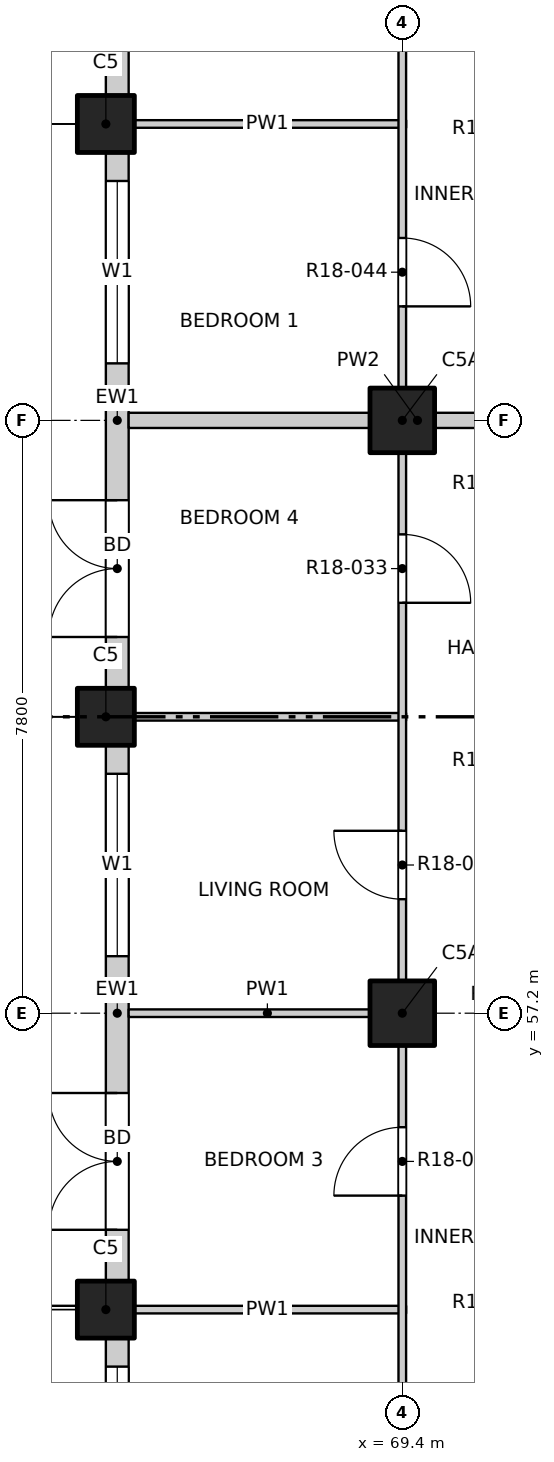
"""IFC4 building model, lengths in metres.
Left out: names, types, materials, properties, quantities, classifications, styles, units other than length and angle.
Written with IfcOpenShell. Run it as: python <this file> out.ifc"""

import sys

from ifc_helpers import new_model, si_unit, direction, frame, frame_2d, origin, origin_2d, place, context, subcontext, project, spatial, rectangle, extrude, element, fill, save


model = new_model("IFC4")
c1 = context("Model", 3, precision=1e-05, world=origin(), true_north=direction((0.0, 1.0)))
c2 = subcontext(c1, "Body", "Model", "MODEL_VIEW")
j1 = project(units=[si_unit("LENGTHUNIT", "METRE"), si_unit("PLANEANGLEUNIT", "RADIAN")], contexts=[c1])
p1 = place(None, origin())
s1 = spatial("IfcSite", under=j1, at=p1, CompositionType="ELEMENT")
p2 = place(p1, origin())
s2 = spatial("IfcBuilding", under=s1, at=p2, CompositionType="ELEMENT")
p3 = place(p2, frame((0.0, 0.0, 186.0)))
s3 = spatial("IfcBuildingStorey", under=s2, at=p3, CompositionType="ELEMENT", Elevation=186.0)
for number, where, z_axis, x_axis in (
    (1, (65.5, 53.3, -0.25), (0.0, 0.0, 1.0), (1.0, 0.0, 0.0)),
    (2, (65.5, 61.1, -0.25), (0.0, 0.0, 1.0), (1.0, 0.0, 0.0)),
    (3, (65.5, 68.9, -0.25), (0.0, 0.0, 1.0), (1.0, 0.0, 0.0)),
):
    element("IfcColumn", number, at=place(p3, frame(where, z_axis=z_axis, x_axis=x_axis)), inside=s3, PredefinedType="COLUMN", context=c2, shape_type="SweptSolid", body=[
        extrude(rectangle(XDim=0.75, YDim=0.75, at=origin_2d()), origin(), (0.0, 0.0, 1.0), 3.4),
    ])
for number, where, z_axis, x_axis in (
    (4, (69.4, 57.2, -0.25), (0.0, 0.0, 1.0), (1.0, 0.0, 0.0)),
    (5, (69.4, 65.0, -0.25), (0.0, 0.0, 1.0), (1.0, 0.0, 0.0)),
):
    element("IfcColumn", number, at=place(p3, frame(where, z_axis=z_axis, x_axis=x_axis)), inside=s3, PredefinedType="COLUMN", context=c2, shape_type="SweptSolid", body=[
        extrude(rectangle(XDim=0.85, YDim=0.85, at=origin_2d()), origin(), (0.0, 0.0, 1.0), 3.4),
    ])
p4 = place(p3, frame((65.65, 49.4, 0.0), z_axis=(0.0, 0.0, 1.0), x_axis=(0.0, 1.0, 0.0)))
e6 = element("IfcWall", 6, at=p4, inside=s3, PredefinedType="SOLIDWALL", context=c2, shape_type="SweptSolid", body=[
    extrude(rectangle(XDim=3.525, YDim=0.3, at=frame_2d((1.763, 0.0))), origin(), (0.0, 0.0, 1.0), 2.7),
])
p5 = place(p4, frame((0.75, 0.0, 0.9)))
e7 = element("IfcOpeningElement", 7, at=p5, cuts=e6, PredefinedType="OPENING", context=c2, shape_type="SweptSolid", body=[
    extrude(rectangle(XDim=2.4, YDim=1.8, at=frame_2d((1.2, 0.9))), frame((0.0, 0.16, 0.0), z_axis=(0.0, -1.0, 0.0), x_axis=(1.0, 0.0, 0.0)), (0.0, 0.0, 1.0), 0.32),
])
p6 = place(p3, frame((65.65, 53.675, 0.0), z_axis=(0.0, 0.0, 1.0), x_axis=(0.0, 1.0, 0.0)))
e8 = element("IfcWall", 8, at=p6, inside=s3, PredefinedType="SOLIDWALL", context=c2, shape_type="SweptSolid", body=[
    extrude(rectangle(XDim=7.05, YDim=0.3, at=frame_2d((3.525, 0.0))), origin(), (0.0, 0.0, 1.0), 2.7),
])
p7 = place(p6, frame((0.675, 0.0, 0.0)))
e9 = element("IfcOpeningElement", 9, at=p7, cuts=e8, PredefinedType="OPENING", context=c2, shape_type="SweptSolid", body=[
    extrude(rectangle(XDim=1.8, YDim=2.4, at=frame_2d((0.9, 1.2))), frame((0.0, 0.16, 0.0), z_axis=(0.0, -1.0, 0.0), x_axis=(1.0, 0.0, 0.0)), (0.0, 0.0, 1.0), 0.32),
])
p8 = place(p6, frame((4.275, 0.0, 0.9)))
e10 = element("IfcOpeningElement", 10, at=p8, cuts=e8, PredefinedType="OPENING", context=c2, shape_type="SweptSolid", body=[
    extrude(rectangle(XDim=2.4, YDim=1.8, at=frame_2d((1.2, 0.9))), frame((0.0, 0.16, 0.0), z_axis=(0.0, -1.0, 0.0), x_axis=(1.0, 0.0, 0.0)), (0.0, 0.0, 1.0), 0.32),
])
p9 = place(p3, frame((65.65, 61.475, 0.0), z_axis=(0.0, 0.0, 1.0), x_axis=(0.0, 1.0, 0.0)))
e11 = element("IfcWall", 11, at=p9, inside=s3, PredefinedType="SOLIDWALL", context=c2, shape_type="SweptSolid", body=[
    extrude(rectangle(XDim=7.05, YDim=0.3, at=frame_2d((3.525, 0.0))), origin(), (0.0, 0.0, 1.0), 2.7),
])
p10 = place(p9, frame((0.675, 0.0, 0.0)))
e12 = element("IfcOpeningElement", 12, at=p10, cuts=e11, PredefinedType="OPENING", context=c2, shape_type="SweptSolid", body=[
    extrude(rectangle(XDim=1.8, YDim=2.4, at=frame_2d((0.9, 1.2))), frame((0.0, 0.16, 0.0), z_axis=(0.0, -1.0, 0.0), x_axis=(1.0, 0.0, 0.0)), (0.0, 0.0, 1.0), 0.32),
])
p11 = place(p9, frame((4.275, 0.0, 0.9)))
e13 = element("IfcOpeningElement", 13, at=p11, cuts=e11, PredefinedType="OPENING", context=c2, shape_type="SweptSolid", body=[
    extrude(rectangle(XDim=2.4, YDim=1.8, at=frame_2d((1.2, 0.9))), frame((0.0, 0.16, 0.0), z_axis=(0.0, -1.0, 0.0), x_axis=(1.0, 0.0, 0.0)), (0.0, 0.0, 1.0), 0.32),
])
p12 = place(p3, frame((65.65, 69.275, 0.0), z_axis=(0.0, 0.0, 1.0), x_axis=(0.0, 1.0, 0.0)))
e14 = element("IfcWall", 14, at=p12, inside=s3, PredefinedType="SOLIDWALL", context=c2, shape_type="SweptSolid", body=[
    extrude(rectangle(XDim=7.05, YDim=0.3, at=frame_2d((3.525, 0.0))), origin(), (0.0, 0.0, 1.0), 2.7),
])
p13 = place(p12, frame((0.675, 0.0, 0.0)))
e15 = element("IfcOpeningElement", 15, at=p13, cuts=e14, PredefinedType="OPENING", context=c2, shape_type="SweptSolid", body=[
    extrude(rectangle(XDim=1.8, YDim=2.4, at=frame_2d((0.9, 1.2))), frame((0.0, 0.16, 0.0), z_axis=(0.0, -1.0, 0.0), x_axis=(1.0, 0.0, 0.0)), (0.0, 0.0, 1.0), 0.32),
])
p14 = place(p12, frame((4.275, 0.0, 0.9)))
e16 = element("IfcOpeningElement", 16, at=p14, cuts=e14, PredefinedType="OPENING", context=c2, shape_type="SweptSolid", body=[
    extrude(rectangle(XDim=2.4, YDim=1.8, at=frame_2d((1.2, 0.9))), frame((0.0, 0.16, 0.0), z_axis=(0.0, -1.0, 0.0), x_axis=(1.0, 0.0, 0.0)), (0.0, 0.0, 1.0), 0.32),
])
for number, where, z_axis, x_axis in (
    (17, (65.8, 53.3, 0.0), (0.0, 0.0, 1.0), (1.0, 0.0, 0.0)),
    (18, (65.8, 57.2, 0.0), (0.0, 0.0, 1.0), (1.0, 0.0, 0.0)),
):
    element("IfcWall", number, at=place(p3, frame(where, z_axis=z_axis, x_axis=x_axis)), inside=s3, PredefinedType="PARTITIONING", context=c2, shape_type="SweptSolid", body=[
        extrude(rectangle(XDim=3.65, YDim=0.1, at=frame_2d((1.825, 0.0))), origin(), (0.0, 0.0, 1.0), 3.15),
    ])
p15 = place(p3, frame((65.8, 61.1, 0.0), z_axis=(0.0, 0.0, 1.0), x_axis=(1.0, 0.0, 0.0)))
e19 = element("IfcWall", 19, at=p15, inside=s3, PredefinedType="PARTITIONING", context=c2, shape_type="SweptSolid", body=[
    extrude(rectangle(XDim=3.65, YDim=0.1, at=frame_2d((1.825, 0.0))), origin(), (0.0, 0.0, 1.0), 2.55),
])
p16 = place(p3, frame((65.8, 65.0, 0.0), z_axis=(0.0, 0.0, 1.0), x_axis=(1.0, 0.0, 0.0)))
e20 = element("IfcWall", 20, at=p16, inside=s3, PredefinedType="PARTITIONING", context=c2, shape_type="SweptSolid", body=[
    extrude(rectangle(XDim=7.6, YDim=0.2, at=frame_2d((3.8, 0.0))), origin(), (0.0, 0.0, 1.0), 3.15),
])
p17 = place(p3, frame((65.8, 68.9, 0.0), z_axis=(0.0, 0.0, 1.0), x_axis=(1.0, 0.0, 0.0)))
e21 = element("IfcWall", 21, at=p17, inside=s3, PredefinedType="PARTITIONING", context=c2, shape_type="SweptSolid", body=[
    extrude(rectangle(XDim=3.65, YDim=0.1, at=frame_2d((1.825, 0.0))), origin(), (0.0, 0.0, 1.0), 2.55),
])
p18 = place(p3, frame((69.4, 45.8, 0.0), z_axis=(0.0, 0.0, 1.0), x_axis=(0.0, 1.0, 0.0)))
e22 = element("IfcWall", 22, at=p18, inside=s3, PredefinedType="PARTITIONING", context=c2, shape_type="SweptSolid", body=[
    extrude(rectangle(XDim=38.4, YDim=0.1, at=frame_2d((19.2, 0.0))), origin(), (0.0, 0.0, 1.0), 3.15),
])
p19 = place(p18, frame((1.05, 0.0, 0.0)))
e23 = element("IfcOpeningElement", 23, at=p19, cuts=e22, PredefinedType="OPENING", context=c2, shape_type="SweptSolid", body=[
    extrude(rectangle(XDim=1.2, YDim=2.1, at=frame_2d((0.6, 1.05))), frame((0.0, 0.06, 0.0), z_axis=(0.0, -1.0, 0.0), x_axis=(1.0, 0.0, 0.0)), (0.0, 0.0, 1.0), 0.12),
])
p20 = place(p18, frame((5.1, 0.0, 0.0)))
e24 = element("IfcOpeningElement", 24, at=p20, cuts=e22, PredefinedType="OPENING", context=c2, shape_type="SweptSolid", body=[
    extrude(rectangle(XDim=0.9, YDim=2.1, at=frame_2d((0.45, 1.05))), frame((0.0, 0.06, 0.0), z_axis=(0.0, -1.0, 0.0), x_axis=(1.0, 0.0, 0.0)), (0.0, 0.0, 1.0), 0.12),
])
p21 = place(p18, frame((9.0, 0.0, 0.0)))
e25 = element("IfcOpeningElement", 25, at=p21, cuts=e22, PredefinedType="OPENING", context=c2, shape_type="SweptSolid", body=[
    extrude(rectangle(XDim=0.9, YDim=2.1, at=frame_2d((0.45, 1.05))), frame((0.0, 0.06, 0.0), z_axis=(0.0, -1.0, 0.0), x_axis=(1.0, 0.0, 0.0)), (0.0, 0.0, 1.0), 0.12),
])
p22 = place(p18, frame((12.9, 0.0, 0.0)))
e26 = element("IfcOpeningElement", 26, at=p22, cuts=e22, PredefinedType="OPENING", context=c2, shape_type="SweptSolid", body=[
    extrude(rectangle(XDim=0.9, YDim=2.1, at=frame_2d((0.45, 1.05))), frame((0.0, 0.06, 0.0), z_axis=(0.0, -1.0, 0.0), x_axis=(1.0, 0.0, 0.0)), (0.0, 0.0, 1.0), 0.12),
])
p23 = place(p18, frame((16.8, 0.0, 0.0)))
e27 = element("IfcOpeningElement", 27, at=p23, cuts=e22, PredefinedType="OPENING", context=c2, shape_type="SweptSolid", body=[
    extrude(rectangle(XDim=0.9, YDim=2.1, at=frame_2d((0.45, 1.05))), frame((0.0, 0.06, 0.0), z_axis=(0.0, -1.0, 0.0), x_axis=(1.0, 0.0, 0.0)), (0.0, 0.0, 1.0), 0.12),
])
p24 = place(p18, frame((20.7, 0.0, 0.0)))
e28 = element("IfcOpeningElement", 28, at=p24, cuts=e22, PredefinedType="OPENING", context=c2, shape_type="SweptSolid", body=[
    extrude(rectangle(XDim=0.9, YDim=2.1, at=frame_2d((0.45, 1.05))), frame((0.0, 0.06, 0.0), z_axis=(0.0, -1.0, 0.0), x_axis=(1.0, 0.0, 0.0)), (0.0, 0.0, 1.0), 0.12),
])
p25 = place(p18, frame((24.6, 0.0, 0.0)))
e29 = element("IfcOpeningElement", 29, at=p25, cuts=e22, PredefinedType="OPENING", context=c2, shape_type="SweptSolid", body=[
    extrude(rectangle(XDim=0.9, YDim=2.1, at=frame_2d((0.45, 1.05))), frame((0.0, 0.06, 0.0), z_axis=(0.0, -1.0, 0.0), x_axis=(1.0, 0.0, 0.0)), (0.0, 0.0, 1.0), 0.12),
])
p26 = place(p18, frame((28.5, 0.0, 0.0)))
e30 = element("IfcOpeningElement", 30, at=p26, cuts=e22, PredefinedType="OPENING", context=c2, shape_type="SweptSolid", body=[
    extrude(rectangle(XDim=0.9, YDim=2.1, at=frame_2d((0.45, 1.05))), frame((0.0, 0.06, 0.0), z_axis=(0.0, -1.0, 0.0), x_axis=(1.0, 0.0, 0.0)), (0.0, 0.0, 1.0), 0.12),
])
p27 = place(p18, frame((32.4, 0.0, 0.0)))
e31 = element("IfcOpeningElement", 31, at=p27, cuts=e22, PredefinedType="OPENING", context=c2, shape_type="SweptSolid", body=[
    extrude(rectangle(XDim=0.9, YDim=2.1, at=frame_2d((0.45, 1.05))), frame((0.0, 0.06, 0.0), z_axis=(0.0, -1.0, 0.0), x_axis=(1.0, 0.0, 0.0)), (0.0, 0.0, 1.0), 0.12),
])
p28 = place(p18, frame((36.15, 0.0, 0.0)))
e32 = element("IfcOpeningElement", 32, at=p28, cuts=e22, PredefinedType="OPENING", context=c2, shape_type="SweptSolid", body=[
    extrude(rectangle(XDim=1.2, YDim=2.1, at=frame_2d((0.6, 1.05))), frame((0.0, 0.06, 0.0), z_axis=(0.0, -1.0, 0.0), x_axis=(1.0, 0.0, 0.0)), (0.0, 0.0, 1.0), 0.12),
])
p29 = place(p5, origin())
e33 = element("IfcWindow", 33, at=p29, inside=s3, PartitioningType="DOUBLE_PANEL_VERTICAL", PredefinedType="WINDOW", context=c2, shape_type="SweptSolid", body=[
    extrude(rectangle(XDim=2.4, YDim=1.8, at=frame_2d((1.2, 0.9))), frame((0.0, 0.03, 0.0), z_axis=(0.0, -1.0, 0.0), x_axis=(1.0, 0.0, 0.0)), (0.0, 0.0, 1.0), 0.06),
])
fill(e7, e33)
p30 = place(p7, origin())
e34 = element("IfcDoor", 34, at=p30, inside=s3, OperationType="DOUBLE_DOOR_SINGLE_SWING", PredefinedType="DOOR", context=c2, shape_type="SweptSolid", body=[
    extrude(rectangle(XDim=1.8, YDim=2.4, at=frame_2d((0.9, 1.2))), frame((0.0, 0.025, 0.0), z_axis=(0.0, -1.0, 0.0), x_axis=(1.0, 0.0, 0.0)), (0.0, 0.0, 1.0), 0.05),
])
fill(e9, e34)
p31 = place(p8, origin())
e35 = element("IfcWindow", 35, at=p31, inside=s3, PartitioningType="DOUBLE_PANEL_VERTICAL", PredefinedType="WINDOW", context=c2, shape_type="SweptSolid", body=[
    extrude(rectangle(XDim=2.4, YDim=1.8, at=frame_2d((1.2, 0.9))), frame((0.0, 0.03, 0.0), z_axis=(0.0, -1.0, 0.0), x_axis=(1.0, 0.0, 0.0)), (0.0, 0.0, 1.0), 0.06),
])
fill(e10, e35)
p32 = place(p10, origin())
e36 = element("IfcDoor", 36, at=p32, inside=s3, OperationType="DOUBLE_DOOR_SINGLE_SWING", PredefinedType="DOOR", context=c2, shape_type="SweptSolid", body=[
    extrude(rectangle(XDim=1.8, YDim=2.4, at=frame_2d((0.9, 1.2))), frame((0.0, 0.025, 0.0), z_axis=(0.0, -1.0, 0.0), x_axis=(1.0, 0.0, 0.0)), (0.0, 0.0, 1.0), 0.05),
])
fill(e12, e36)
p33 = place(p11, origin())
e37 = element("IfcWindow", 37, at=p33, inside=s3, PartitioningType="DOUBLE_PANEL_VERTICAL", PredefinedType="WINDOW", context=c2, shape_type="SweptSolid", body=[
    extrude(rectangle(XDim=2.4, YDim=1.8, at=frame_2d((1.2, 0.9))), frame((0.0, 0.03, 0.0), z_axis=(0.0, -1.0, 0.0), x_axis=(1.0, 0.0, 0.0)), (0.0, 0.0, 1.0), 0.06),
])
fill(e13, e37)
p34 = place(p21, origin())
e38 = element("IfcDoor", 38, at=p34, inside=s3, OperationType="SINGLE_SWING_LEFT", PredefinedType="DOOR", context=c2, shape_type="SweptSolid", body=[
    extrude(rectangle(XDim=0.9, YDim=2.1, at=frame_2d((0.45, 1.05))), frame((0.0, 0.025, 0.0), z_axis=(0.0, -1.0, 0.0), x_axis=(1.0, 0.0, 0.0)), (0.0, 0.0, 1.0), 0.05),
])
fill(e25, e38)
p35 = place(p22, origin())
e39 = element("IfcDoor", 39, at=p35, inside=s3, OperationType="SINGLE_SWING_RIGHT", PredefinedType="DOOR", context=c2, shape_type="SweptSolid", body=[
    extrude(rectangle(XDim=0.9, YDim=2.1, at=frame_2d((0.45, 1.05))), frame((0.0, 0.025, 0.0), z_axis=(0.0, -1.0, 0.0), x_axis=(1.0, 0.0, 0.0)), (0.0, 0.0, 1.0), 0.05),
])
fill(e26, e39)
p36 = place(p23, origin())
e40 = element("IfcDoor", 40, at=p36, inside=s3, OperationType="SINGLE_SWING_RIGHT", PredefinedType="DOOR", context=c2, shape_type="SweptSolid", body=[
    extrude(rectangle(XDim=0.9, YDim=2.1, at=frame_2d((0.45, 1.05))), frame((0.0, 0.025, 0.0), z_axis=(0.0, -1.0, 0.0), x_axis=(1.0, 0.0, 0.0)), (0.0, 0.0, 1.0), 0.05),
])
fill(e27, e40)
p37 = place(p24, origin())
e41 = element("IfcDoor", 41, at=p37, inside=s3, OperationType="SINGLE_SWING_RIGHT", PredefinedType="DOOR", context=c2, shape_type="SweptSolid", body=[
    extrude(rectangle(XDim=0.9, YDim=2.1, at=frame_2d((0.45, 1.05))), frame((0.0, 0.025, 0.0), z_axis=(0.0, -1.0, 0.0), x_axis=(1.0, 0.0, 0.0)), (0.0, 0.0, 1.0), 0.05),
])
fill(e28, e41)
save(model, sys.argv[1])
